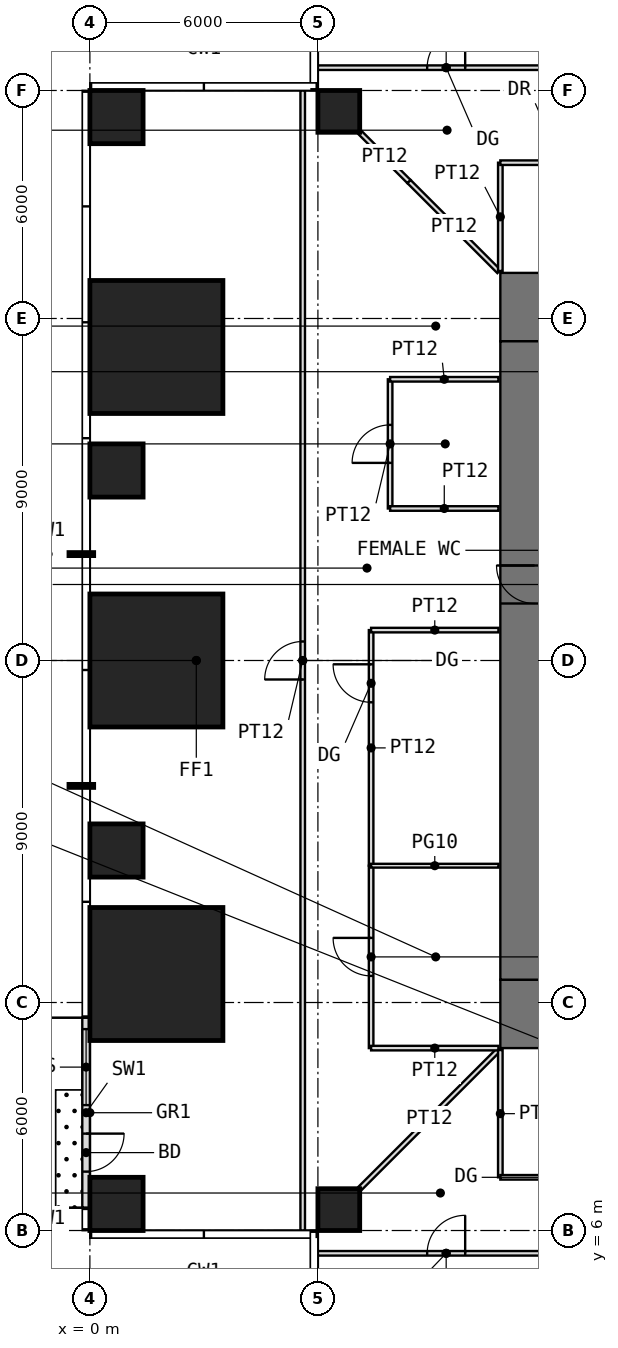
"""IFC4 building model, lengths in metres.
Left out: names, types, materials, properties, quantities, classifications, styles, units other than length and angle.
Written with IfcOpenShell. Run it as: python <this file> out.ifc"""

import sys

from ifc_helpers import new_model, si_unit, direction, frame, frame_2d, origin, origin_2d, place, context, subcontext, project, spatial, rectangle, extrude, element, fill, save


model = new_model("IFC4")
c1 = context("Model", 3, precision=1e-05, world=origin(), true_north=direction((0.0, 1.0)))
c2 = subcontext(c1, "Body", "Model", "MODEL_VIEW")
j1 = project(units=[si_unit("LENGTHUNIT", "METRE"), si_unit("PLANEANGLEUNIT", "RADIAN")], contexts=[c1])
p1 = place(None, origin())
s1 = spatial("IfcSite", under=j1, at=p1, CompositionType="ELEMENT")
p2 = place(p1, origin())
s2 = spatial("IfcBuilding", under=s1, at=p2, CompositionType="ELEMENT")
p3 = place(p2, frame((0.0, 0.0, 46.5)))
s3 = spatial("IfcBuildingStorey", under=s2, at=p3, CompositionType="ELEMENT", Elevation=46.5)
p4 = place(p3, frame((0.7, 6.7, 0.0), z_axis=(0.0, 0.0, 1.0), x_axis=(1.0, 0.0, 0.0)))
e1 = element("IfcColumn", 1, at=p4, inside=s3, PredefinedType="COLUMN", context=c2, shape_type="SweptSolid", body=[
    extrude(rectangle(XDim=1.4, YDim=1.4, at=origin_2d()), origin(), (0.0, 0.0, 1.0), 4.0),
])
p5 = place(p3, frame((6.55, 6.55, 0.0), z_axis=(0.0, 0.0, 1.0), x_axis=(1.0, 0.0, 0.0)))
e2 = element("IfcColumn", 2, at=p5, inside=s3, PredefinedType="COLUMN", context=c2, shape_type="SweptSolid", body=[
    extrude(rectangle(XDim=1.1, YDim=1.1, at=origin_2d()), origin(), (0.0, 0.0, 1.0), 4.0),
])
p6 = place(p3, frame((1.75, 12.75, 0.0), z_axis=(0.0, 0.0, 1.0), x_axis=(1.0, 0.0, 0.0)))
e3 = element("IfcColumn", 3, at=p6, inside=s3, PredefinedType="COLUMN", context=c2, shape_type="SweptSolid", body=[
    extrude(rectangle(XDim=3.5, YDim=3.5, at=origin_2d()), origin(), (0.0, 0.0, 1.0), 4.0),
])
p7 = place(p3, frame((0.7, 16.0, 0.0), z_axis=(0.0, 0.0, 1.0), x_axis=(1.0, 0.0, 0.0)))
e4 = element("IfcColumn", 4, at=p7, inside=s3, PredefinedType="COLUMN", context=c2, shape_type="SweptSolid", body=[
    extrude(rectangle(XDim=1.4, YDim=1.4, at=origin_2d()), origin(), (0.0, 0.0, 1.0), 4.0),
])
p8 = place(p3, frame((1.75, 21.0, 0.0), z_axis=(0.0, 0.0, 1.0), x_axis=(1.0, 0.0, 0.0)))
e5 = element("IfcColumn", 5, at=p8, inside=s3, PredefinedType="COLUMN", context=c2, shape_type="SweptSolid", body=[
    extrude(rectangle(XDim=3.5, YDim=3.5, at=origin_2d()), origin(), (0.0, 0.0, 1.0), 4.0),
])
p9 = place(p3, frame((0.7, 26.0, 0.0), z_axis=(0.0, 0.0, 1.0), x_axis=(1.0, 0.0, 0.0)))
e6 = element("IfcColumn", 6, at=p9, inside=s3, PredefinedType="COLUMN", context=c2, shape_type="SweptSolid", body=[
    extrude(rectangle(XDim=1.4, YDim=1.4, at=origin_2d()), origin(), (0.0, 0.0, 1.0), 4.0),
])
p10 = place(p3, frame((1.75, 29.25, 0.0), z_axis=(0.0, 0.0, 1.0), x_axis=(1.0, 0.0, 0.0)))
e7 = element("IfcColumn", 7, at=p10, inside=s3, PredefinedType="COLUMN", context=c2, shape_type="SweptSolid", body=[
    extrude(rectangle(XDim=3.5, YDim=3.5, at=origin_2d()), origin(), (0.0, 0.0, 1.0), 4.0),
])
p11 = place(p3, frame((0.7, 35.3, 0.0), z_axis=(0.0, 0.0, 1.0), x_axis=(1.0, 0.0, 0.0)))
e8 = element("IfcColumn", 8, at=p11, inside=s3, PredefinedType="COLUMN", context=c2, shape_type="SweptSolid", body=[
    extrude(rectangle(XDim=1.4, YDim=1.4, at=origin_2d()), origin(), (0.0, 0.0, 1.0), 4.0),
])
p12 = place(p3, frame((6.55, 35.45, 0.0), z_axis=(0.0, 0.0, 1.0), x_axis=(1.0, 0.0, 0.0)))
e9 = element("IfcColumn", 9, at=p12, inside=s3, PredefinedType="COLUMN", context=c2, shape_type="SweptSolid", body=[
    extrude(rectangle(XDim=1.1, YDim=1.1, at=origin_2d()), origin(), (0.0, 0.0, 1.0), 4.0),
])
p13 = place(p3, frame((-0.1, 11.6, 0.0), z_axis=(0.0, 0.0, 1.0), x_axis=(0.0, -1.0, 0.0)))
e10 = element("IfcWall", 10, at=p13, inside=s3, PredefinedType="USERDEFINED", context=c2, shape_type="SweptSolid", body=[
    extrude(rectangle(XDim=5.0, YDim=0.2, at=frame_2d((2.5, 0.0))), origin(), (0.0, 0.0, 1.0), 3.75),
])
p14 = place(p13, frame((3.05, 0.0, 0.0)))
e11 = element("IfcOpeningElement", 11, at=p14, cuts=e10, PredefinedType="OPENING", context=c2, shape_type="SweptSolid", body=[
    extrude(rectangle(XDim=1.0, YDim=2.4, at=frame_2d((0.5, 1.2))), frame((0.0, 0.11, 0.0), z_axis=(0.0, -1.0, 0.0), x_axis=(1.0, 0.0, 0.0)), (0.0, 0.0, 1.0), 0.22),
])
p15 = place(p13, frame((0.3, 0.0, 0.3)))
e12 = element("IfcOpeningElement", 12, at=p15, cuts=e10, PredefinedType="OPENING", context=c2, shape_type="SweptSolid", body=[
    extrude(rectangle(XDim=2.0, YDim=2.7, at=frame_2d((1.0, 1.35))), frame((0.0, 0.11, 0.0), z_axis=(0.0, -1.0, 0.0), x_axis=(1.0, 0.0, 0.0)), (0.0, 0.0, 1.0), 0.22),
])
p16 = place(p3, frame((10.8, 11.7, -0.05), z_axis=(0.0, 0.0, 1.0), x_axis=(1.0, 0.0, 0.0)))
e13 = element("IfcWall", 13, at=p16, inside=s3, PredefinedType="SHEAR", context=c2, shape_type="SweptSolid", body=[
    extrude(rectangle(XDim=20.4, YDim=1.8, at=frame_2d((10.2, 0.0))), origin(), (0.0, 0.0, 1.0), 4.0),
])
p17 = place(p16, frame((9.2, 0.0, 0.05)))
e14 = element("IfcOpeningElement", 14, at=p17, cuts=e13, PredefinedType="OPENING", context=c2, shape_type="SweptSolid", body=[
    extrude(rectangle(XDim=2.0, YDim=2.2, at=frame_2d((1.0, 1.1))), frame((0.0, 0.91, 0.0), z_axis=(0.0, -1.0, 0.0), x_axis=(1.0, 0.0, 0.0)), (0.0, 0.0, 1.0), 1.82),
])
p18 = place(p3, frame((10.8, 30.3, -0.05), z_axis=(0.0, 0.0, 1.0), x_axis=(1.0, 0.0, 0.0)))
e15 = element("IfcWall", 15, at=p18, inside=s3, PredefinedType="SHEAR", context=c2, shape_type="SweptSolid", body=[
    extrude(rectangle(XDim=20.4, YDim=1.8, at=frame_2d((10.2, 0.0))), origin(), (0.0, 0.0, 1.0), 4.0),
])
p19 = place(p18, frame((9.2, 0.0, 0.05)))
e16 = element("IfcOpeningElement", 16, at=p19, cuts=e15, PredefinedType="OPENING", context=c2, shape_type="SweptSolid", body=[
    extrude(rectangle(XDim=2.0, YDim=2.2, at=frame_2d((1.0, 1.1))), frame((0.0, 0.91, 0.0), z_axis=(0.0, -1.0, 0.0), x_axis=(1.0, 0.0, 0.0)), (0.0, 0.0, 1.0), 1.82),
])
p20 = place(p3, frame((11.7, 12.6, -0.05), z_axis=(0.0, 0.0, 1.0), x_axis=(0.0, 1.0, 0.0)))
e17 = element("IfcWall", 17, at=p20, inside=s3, PredefinedType="SHEAR", context=c2, shape_type="SweptSolid", body=[
    extrude(rectangle(XDim=16.8, YDim=1.8, at=frame_2d((8.4, 0.0))), origin(), (0.0, 0.0, 1.0), 4.0),
])
p21 = place(p20, frame((9.9, 0.0, 0.05)))
e18 = element("IfcOpeningElement", 18, at=p21, cuts=e17, PredefinedType="OPENING", context=c2, shape_type="SweptSolid", body=[
    extrude(rectangle(XDim=1.0, YDim=2.2, at=frame_2d((0.5, 1.1))), frame((0.0, 0.91, 0.0), z_axis=(0.0, -1.0, 0.0), x_axis=(1.0, 0.0, 0.0)), (0.0, 0.0, 1.0), 1.82),
])
p22 = place(p3, frame((5.6, 6.0, 0.0), z_axis=(0.0, 0.0, 1.0), x_axis=(0.0, 1.0, 0.0)))
e19 = element("IfcWall", 19, at=p22, inside=s3, PredefinedType="PARTITIONING", context=c2, shape_type="SweptSolid", body=[
    extrude(rectangle(XDim=30.0, YDim=0.12, at=frame_2d((15.0, 0.0))), origin(), (0.0, 0.0, 1.0), 3.75),
])
p23 = place(p22, frame((14.5, 0.0, 0.0)))
e20 = element("IfcOpeningElement", 20, at=p23, cuts=e19, PredefinedType="OPENING", context=c2, shape_type="SweptSolid", body=[
    extrude(rectangle(XDim=1.0, YDim=2.4, at=frame_2d((0.5, 1.2))), frame((0.0, 0.07, 0.0), z_axis=(0.0, -1.0, 0.0), x_axis=(1.0, 0.0, 0.0)), (0.0, 0.0, 1.0), 0.14),
])
p24 = place(p3, frame((6.0, 5.4, 0.0), z_axis=(0.0, 0.0, 1.0), x_axis=(1.0, 0.0, 0.0)))
e21 = element("IfcWall", 21, at=p24, inside=s3, PredefinedType="PARTITIONING", context=c2, shape_type="SweptSolid", body=[
    extrude(rectangle(XDim=6.75, YDim=0.12, at=frame_2d((3.375, 0.0))), origin(), (0.0, 0.0, 1.0), 3.75),
])
p25 = place(p24, frame((2.875, 0.0, 0.0)))
e22 = element("IfcOpeningElement", 22, at=p25, cuts=e21, PredefinedType="OPENING", context=c2, shape_type="SweptSolid", body=[
    extrude(rectangle(XDim=1.0, YDim=2.2, at=frame_2d((0.5, 1.1))), frame((0.0, 0.07, 0.0), z_axis=(0.0, -1.0, 0.0), x_axis=(1.0, 0.0, 0.0)), (0.0, 0.0, 1.0), 0.14),
])
p26 = place(p3, frame((6.0, 36.6, 0.0), z_axis=(0.0, 0.0, 1.0), x_axis=(1.0, 0.0, 0.0)))
e23 = element("IfcWall", 23, at=p26, inside=s3, PredefinedType="PARTITIONING", context=c2, shape_type="SweptSolid", body=[
    extrude(rectangle(XDim=6.75, YDim=0.12, at=frame_2d((3.375, 0.0))), origin(), (0.0, 0.0, 1.0), 3.75),
])
p27 = place(p26, frame((2.875, 0.0, 0.0)))
e24 = element("IfcOpeningElement", 24, at=p27, cuts=e23, PredefinedType="OPENING", context=c2, shape_type="SweptSolid", body=[
    extrude(rectangle(XDim=1.0, YDim=2.4, at=frame_2d((0.5, 1.2))), frame((0.0, 0.07, 0.0), z_axis=(0.0, -1.0, 0.0), x_axis=(1.0, 0.0, 0.0)), (0.0, 0.0, 1.0), 0.14),
])
p28 = place(p3, frame((7.11, 7.11, 0.0), z_axis=(0.0, 0.0, 1.0), x_axis=(0.707106781187, 0.707106781187, 0.0)))
e25 = element("IfcWall", 25, at=p28, inside=s3, PredefinedType="PARTITIONING", context=c2, shape_type="SweptSolid", body=[
    extrude(rectangle(XDim=5.168, YDim=0.12, at=frame_2d((2.584, 0.0))), origin(), (0.0, 0.0, 1.0), 3.75),
])
p29 = place(p3, frame((7.11, 34.89, 0.0), z_axis=(0.0, 0.0, 1.0), x_axis=(0.707106781187, -0.707106781187, 0.0)))
e26 = element("IfcWall", 26, at=p29, inside=s3, PredefinedType="PARTITIONING", context=c2, shape_type="SweptSolid", body=[
    extrude(rectangle(XDim=1.822, YDim=0.12, at=frame_2d((0.911, 0.0))), origin(), (0.0, 0.0, 1.0), 3.75),
])
p30 = place(p3, frame((7.4, 10.8, 0.0), z_axis=(0.0, 0.0, 1.0), x_axis=(0.0, 1.0, 0.0)))
e27 = element("IfcWall", 27, at=p30, inside=s3, PredefinedType="PARTITIONING", context=c2, shape_type="SweptSolid", body=[
    extrude(rectangle(XDim=4.8, YDim=0.12, at=frame_2d((2.4, 0.0))), origin(), (0.0, 0.0, 1.0), 3.75),
])
p31 = place(p30, frame((1.9, 0.0, 0.0)))
e28 = element("IfcOpeningElement", 28, at=p31, cuts=e27, PredefinedType="OPENING", context=c2, shape_type="SweptSolid", body=[
    extrude(rectangle(XDim=1.0, YDim=2.4, at=frame_2d((0.5, 1.2))), frame((0.0, 0.07, 0.0), z_axis=(0.0, -1.0, 0.0), x_axis=(1.0, 0.0, 0.0)), (0.0, 0.0, 1.0), 0.14),
])
p32 = place(p3, frame((7.4, 10.8, 0.0), z_axis=(0.0, 0.0, 1.0), x_axis=(1.0, 0.0, 0.0)))
e29 = element("IfcWall", 29, at=p32, inside=s3, PredefinedType="PARTITIONING", context=c2, shape_type="SweptSolid", body=[
    extrude(rectangle(XDim=3.35, YDim=0.12, at=frame_2d((1.675, 0.0))), origin(), (0.0, 0.0, 1.0), 3.75),
])
p33 = place(p3, frame((7.4, 15.6, 0.0), z_axis=(0.0, 0.0, 1.0), x_axis=(0.0, 1.0, 0.0)))
e30 = element("IfcWall", 30, at=p33, inside=s3, PredefinedType="PARTITIONING", context=c2, shape_type="SweptSolid", body=[
    extrude(rectangle(XDim=6.2, YDim=0.12, at=frame_2d((3.1, 0.0))), origin(), (0.0, 0.0, 1.0), 3.75),
])
p34 = place(p33, frame((4.3, 0.0, 0.0)))
e31 = element("IfcOpeningElement", 31, at=p34, cuts=e30, PredefinedType="OPENING", context=c2, shape_type="SweptSolid", body=[
    extrude(rectangle(XDim=1.0, YDim=2.4, at=frame_2d((0.5, 1.2))), frame((0.0, 0.07, 0.0), z_axis=(0.0, -1.0, 0.0), x_axis=(1.0, 0.0, 0.0)), (0.0, 0.0, 1.0), 0.14),
])
p35 = place(p3, frame((7.4, 15.6, 0.0), z_axis=(0.0, 0.0, 1.0), x_axis=(1.0, 0.0, 0.0)))
e32 = element("IfcWall", 32, at=p35, inside=s3, PredefinedType="PARTITIONING", context=c2, shape_type="SweptSolid", body=[
    extrude(rectangle(XDim=3.35, YDim=0.1, at=frame_2d((1.675, 0.0))), origin(), (0.0, 0.0, 1.0), 3.75),
])
p36 = place(p3, frame((7.4, 21.8, 0.0), z_axis=(0.0, 0.0, 1.0), x_axis=(1.0, 0.0, 0.0)))
e33 = element("IfcWall", 33, at=p36, inside=s3, PredefinedType="PARTITIONING", context=c2, shape_type="SweptSolid", body=[
    extrude(rectangle(XDim=3.35, YDim=0.12, at=frame_2d((1.675, 0.0))), origin(), (0.0, 0.0, 1.0), 3.75),
])
p37 = place(p3, frame((7.9, 25.0, 0.0), z_axis=(0.0, 0.0, 1.0), x_axis=(0.0, 1.0, 0.0)))
e34 = element("IfcWall", 34, at=p37, inside=s3, PredefinedType="PARTITIONING", context=c2, shape_type="SweptSolid", body=[
    extrude(rectangle(XDim=3.4, YDim=0.12, at=frame_2d((1.7, 0.0))), origin(), (0.0, 0.0, 1.0), 3.75),
])
p38 = place(p37, frame((1.2, 0.0, 0.0)))
e35 = element("IfcOpeningElement", 35, at=p38, cuts=e34, PredefinedType="OPENING", context=c2, shape_type="SweptSolid", body=[
    extrude(rectangle(XDim=1.0, YDim=2.2, at=frame_2d((0.5, 1.1))), frame((0.0, 0.07, 0.0), z_axis=(0.0, -1.0, 0.0), x_axis=(1.0, 0.0, 0.0)), (0.0, 0.0, 1.0), 0.14),
])
for number, where, z_axis, x_axis in (
    (36, (7.9, 25.0, 0.0), (0.0, 0.0, 1.0), (1.0, 0.0, 0.0)),
    (37, (7.9, 28.4, 0.0), (0.0, 0.0, 1.0), (1.0, 0.0, 0.0)),
):
    element("IfcWall", number, at=place(p3, frame(where, z_axis=z_axis, x_axis=x_axis)), inside=s3, PredefinedType="PARTITIONING", context=c2, shape_type="SweptSolid", body=[
        extrude(rectangle(XDim=2.85, YDim=0.12, at=frame_2d((1.425, 0.0))), origin(), (0.0, 0.0, 1.0), 3.75),
    ])
p39 = place(p3, frame((8.398, 33.602, 0.0), z_axis=(0.0, 0.0, 1.0), x_axis=(0.707106781187, -0.707106781187, 0.0)))
e38 = element("IfcWall", 38, at=p39, inside=s3, PredefinedType="PARTITIONING", context=c2, shape_type="SweptSolid", body=[
    extrude(rectangle(XDim=3.346, YDim=0.12, at=frame_2d((1.673, 0.0))), origin(), (0.0, 0.0, 1.0), 3.75),
])
p40 = place(p3, frame((10.8, 7.4, 0.0), z_axis=(0.0, 0.0, 1.0), x_axis=(0.0, 1.0, 0.0)))
e39 = element("IfcWall", 39, at=p40, inside=s3, PredefinedType="PARTITIONING", context=c2, shape_type="SweptSolid", body=[
    extrude(rectangle(XDim=3.35, YDim=0.12, at=frame_2d((1.675, 0.0))), origin(), (0.0, 0.0, 1.0), 3.75),
])
p41 = place(p3, frame((10.8, 7.4, 0.0), z_axis=(0.0, 0.0, 1.0), x_axis=(1.0, 0.0, 0.0)))
e40 = element("IfcWall", 40, at=p41, inside=s3, PredefinedType="PARTITIONING", context=c2, shape_type="SweptSolid", body=[
    extrude(rectangle(XDim=4.0, YDim=0.12, at=frame_2d((2.0, 0.0))), origin(), (0.0, 0.0, 1.0), 3.75),
])
p42 = place(p41, frame((1.5, 0.0, 0.0)))
e41 = element("IfcOpeningElement", 41, at=p42, cuts=e40, PredefinedType="OPENING", context=c2, shape_type="SweptSolid", body=[
    extrude(rectangle(XDim=1.0, YDim=2.4, at=frame_2d((0.5, 1.2))), frame((0.0, 0.07, 0.0), z_axis=(0.0, -1.0, 0.0), x_axis=(1.0, 0.0, 0.0)), (0.0, 0.0, 1.0), 0.14),
])
p43 = place(p3, frame((10.8, 31.25, 0.0), z_axis=(0.0, 0.0, 1.0), x_axis=(0.0, 1.0, 0.0)))
e42 = element("IfcWall", 42, at=p43, inside=s3, PredefinedType="PARTITIONING", context=c2, shape_type="SweptSolid", body=[
    extrude(rectangle(XDim=2.85, YDim=0.12, at=frame_2d((1.425, 0.0))), origin(), (0.0, 0.0, 1.0), 3.75),
])
p44 = place(p3, frame((10.8, 34.1, 0.0), z_axis=(0.0, 0.0, 1.0), x_axis=(1.0, 0.0, 0.0)))
e43 = element("IfcWall", 43, at=p44, inside=s3, PredefinedType="PARTITIONING", context=c2, shape_type="SweptSolid", body=[
    extrude(rectangle(XDim=3.2, YDim=0.12, at=frame_2d((1.6, 0.0))), origin(), (0.0, 0.0, 1.0), 3.75),
])
p45 = place(p44, frame((1.1, 0.0, 0.0)))
e44 = element("IfcOpeningElement", 44, at=p45, cuts=e43, PredefinedType="OPENING", context=c2, shape_type="SweptSolid", body=[
    extrude(rectangle(XDim=1.0, YDim=2.2, at=frame_2d((0.5, 1.1))), frame((0.0, 0.07, 0.0), z_axis=(0.0, -1.0, 0.0), x_axis=(1.0, 0.0, 0.0)), (0.0, 0.0, 1.0), 0.14),
])
p46 = place(p14, origin())
e45 = element("IfcDoor", 45, at=p46, inside=s3, OperationType="SINGLE_SWING_LEFT", PredefinedType="DOOR", context=c2, shape_type="SweptSolid", body=[
    extrude(rectangle(XDim=1.0, YDim=2.4, at=frame_2d((0.5, 1.2))), frame((0.0, 0.025, 0.0), z_axis=(0.0, -1.0, 0.0), x_axis=(1.0, 0.0, 0.0)), (0.0, 0.0, 1.0), 0.05),
])
fill(e11, e45)
p47 = place(p15, origin())
e46 = element("IfcWindow", 46, at=p47, inside=s3, PartitioningType="SINGLE_PANEL", PredefinedType="WINDOW", context=c2, shape_type="SweptSolid", body=[
    extrude(rectangle(XDim=2.0, YDim=2.7, at=frame_2d((1.0, 1.35))), frame((0.0, 0.03, 0.0), z_axis=(0.0, -1.0, 0.0), x_axis=(1.0, 0.0, 0.0)), (0.0, 0.0, 1.0), 0.06),
])
fill(e12, e46)
p48 = place(p21, origin())
e47 = element("IfcDoor", 47, at=p48, inside=s3, OperationType="SINGLE_SWING_RIGHT", PredefinedType="DOOR", context=c2, shape_type="SweptSolid", body=[
    extrude(rectangle(XDim=1.0, YDim=2.2, at=frame_2d((0.5, 1.1))), frame((0.0, 0.025, 0.0), z_axis=(0.0, -1.0, 0.0), x_axis=(1.0, 0.0, 0.0)), (0.0, 0.0, 1.0), 0.05),
])
fill(e18, e47)
p49 = place(p25, origin())
e48 = element("IfcDoor", 48, at=p49, inside=s3, OperationType="SINGLE_SWING_RIGHT", PredefinedType="DOOR", context=c2, shape_type="SweptSolid", body=[
    extrude(rectangle(XDim=1.0, YDim=2.2, at=frame_2d((0.5, 1.1))), frame((0.0, 0.025, 0.0), z_axis=(0.0, -1.0, 0.0), x_axis=(1.0, 0.0, 0.0)), (0.0, 0.0, 1.0), 0.05),
])
fill(e22, e48)
p50 = place(p27, origin())
e49 = element("IfcDoor", 49, at=p50, inside=s3, OperationType="SINGLE_SWING_RIGHT", PredefinedType="DOOR", context=c2, shape_type="SweptSolid", body=[
    extrude(rectangle(XDim=1.0, YDim=2.4, at=frame_2d((0.5, 1.2))), frame((0.0, 0.025, 0.0), z_axis=(0.0, -1.0, 0.0), x_axis=(1.0, 0.0, 0.0)), (0.0, 0.0, 1.0), 0.05),
])
fill(e24, e49)
p51 = place(p31, origin())
e50 = element("IfcDoor", 50, at=p51, inside=s3, OperationType="SINGLE_SWING_RIGHT", PredefinedType="DOOR", context=c2, shape_type="SweptSolid", body=[
    extrude(rectangle(XDim=1.0, YDim=2.4, at=frame_2d((0.5, 1.2))), frame((0.0, 0.025, 0.0), z_axis=(0.0, -1.0, 0.0), x_axis=(1.0, 0.0, 0.0)), (0.0, 0.0, 1.0), 0.05),
])
fill(e28, e50)
p52 = place(p38, origin())
e51 = element("IfcDoor", 51, at=p52, inside=s3, OperationType="SINGLE_SWING_LEFT", PredefinedType="DOOR", context=c2, shape_type="SweptSolid", body=[
    extrude(rectangle(XDim=1.0, YDim=2.2, at=frame_2d((0.5, 1.1))), frame((0.0, 0.025, 0.0), z_axis=(0.0, -1.0, 0.0), x_axis=(1.0, 0.0, 0.0)), (0.0, 0.0, 1.0), 0.05),
])
fill(e35, e51)
p53 = place(p23, origin())
e52 = element("IfcDoor", 52, at=p53, inside=s3, OperationType="SINGLE_SWING_LEFT", PredefinedType="DOOR", context=c2, shape_type="SweptSolid", body=[
    extrude(rectangle(XDim=1.0, YDim=2.4, at=frame_2d((0.5, 1.2))), frame((0.0, 0.025, 0.0), z_axis=(0.0, -1.0, 0.0), x_axis=(1.0, 0.0, 0.0)), (0.0, 0.0, 1.0), 0.05),
])
fill(e20, e52)
p54 = place(p34, origin())
e53 = element("IfcDoor", 53, at=p54, inside=s3, OperationType="SINGLE_SWING_RIGHT", PredefinedType="DOOR", context=c2, shape_type="SweptSolid", body=[
    extrude(rectangle(XDim=1.0, YDim=2.4, at=frame_2d((0.5, 1.2))), frame((0.0, 0.025, 0.0), z_axis=(0.0, -1.0, 0.0), x_axis=(1.0, 0.0, 0.0)), (0.0, 0.0, 1.0), 0.05),
])
fill(e31, e53)
save(model, sys.argv[1])
